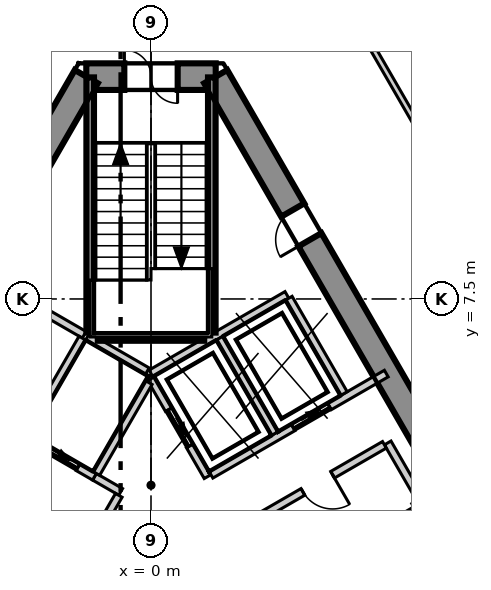
"""IFC4 building model, lengths in metres.
Left out: names, types, materials, properties, quantities, classifications, styles, units other than length and angle.
Written with IfcOpenShell. Run it as: python <this file> out.ifc"""

import sys

from ifc_helpers import new_model, si_unit, direction, frame, frame_2d, origin, place, context, subcontext, project, spatial, polyline, rectangle, outline, extrude, element, fill, save


model = new_model("IFC4")
c1 = context("Model", 3, precision=1e-05, world=origin(), true_north=direction((0.0, 1.0)))
c2 = subcontext(c1, "Body", "Model", "MODEL_VIEW")
j1 = project(units=[si_unit("LENGTHUNIT", "METRE"), si_unit("PLANEANGLEUNIT", "RADIAN")], contexts=[c1])
p1 = place(None, origin())
s1 = spatial("IfcSite", under=j1, at=p1, CompositionType="ELEMENT")
p2 = place(p1, origin())
s2 = spatial("IfcBuilding", under=s1, at=p2, CompositionType="ELEMENT")
p3 = place(p2, frame((0.0, 0.0, 191.3)))
s3 = spatial("IfcBuildingStorey", under=s2, at=p3, CompositionType="ELEMENT", Elevation=191.3)
p4 = place(p3, frame((1.703, 13.35, -0.3), z_axis=(0.0, 0.0, 1.0), x_axis=(-1.0, 0.0, 0.0)))
e1 = element("IfcWall", 1, at=p4, inside=s3, PredefinedType="SHEAR", context=c2, shape_type="SweptSolid", body=[
    extrude(outline(polyline([(-0.202, -0.35), (1.703, -0.35), (3.608, -0.35), (3.204, 0.35), (1.703, 0.35), (0.202, 0.35), (-0.202, -0.35)])), origin(), (0.0, 0.0, 1.0), 4.0),
])
p5 = place(p4, frame((1.003, 0.0, 0.3)))
e2 = element("IfcOpeningElement", 2, at=p5, cuts=e1, PredefinedType="OPENING", context=c2, shape_type="SweptSolid", body=[
    extrude(rectangle(XDim=1.4, YDim=2.1, at=frame_2d((0.7, 1.05))), frame((0.0, 0.36, 0.0), z_axis=(0.0, -1.0, 0.0), x_axis=(1.0, 0.0, 0.0)), (0.0, 0.0, 1.0), 0.72),
])
p6 = place(p3, frame((-1.703, 13.35, -0.3), z_axis=(0.0, 0.0, 1.0), x_axis=(-0.500011533395, -0.866018744874, 0.0)))
e3 = element("IfcWall", 3, at=p6, inside=s3, PredefinedType="SHEAR", context=c2, shape_type="SweptSolid", body=[
    extrude(outline(polyline([(-0.202, -0.35), (1.782, -0.35), (3.766, -0.35), (5.75, -0.35), (7.734, -0.35), (9.718, -0.35), (11.702, -0.35), (13.686, -0.35), (15.67, -0.35), (17.654, -0.35), (19.638, -0.35), (21.622, -0.35), (21.218, 0.35), (19.307, 0.35), (17.397, 0.35), (15.486, 0.35), (13.576, 0.35), (11.665, 0.35), (9.755, 0.35), (7.844, 0.35), (5.934, 0.35), (4.023, 0.35), (2.113, 0.35), (0.202, 0.35), (-0.202, -0.35)])), origin(), (0.0, 0.0, 1.0), 4.0),
])
p7 = place(p6, frame((10.16, 0.0, 0.3)))
e4 = element("IfcOpeningElement", 4, at=p7, cuts=e3, PredefinedType="OPENING", context=c2, shape_type="SweptSolid", body=[
    extrude(rectangle(XDim=1.1, YDim=2.1, at=frame_2d((0.55, 1.05))), frame((0.0, 0.36, 0.0), z_axis=(0.0, -1.0, 0.0), x_axis=(1.0, 0.0, 0.0)), (0.0, 0.0, 1.0), 0.72),
])
p8 = place(p3, frame((12.413, -5.2, -0.3), z_axis=(0.0, 0.0, 1.0), x_axis=(-0.500011533395, 0.866018744874, 0.0)))
e5 = element("IfcWall", 5, at=p8, inside=s3, PredefinedType="SHEAR", context=c2, shape_type="SweptSolid", body=[
    extrude(outline(polyline([(-0.202, -0.35), (1.782, -0.35), (3.766, -0.35), (5.75, -0.35), (7.734, -0.35), (9.718, -0.35), (11.702, -0.35), (13.686, -0.35), (15.67, -0.35), (17.654, -0.35), (19.638, -0.35), (21.622, -0.35), (21.218, 0.35), (19.307, 0.35), (17.397, 0.35), (15.486, 0.35), (13.576, 0.35), (11.665, 0.35), (9.755, 0.35), (7.844, 0.35), (5.934, 0.35), (4.023, 0.35), (2.113, 0.35), (0.202, 0.35), (-0.202, -0.35)])), origin(), (0.0, 0.0, 1.0), 4.0),
])
p9 = place(p8, frame((4.055, 0.0, 0.3)))
e6 = element("IfcOpeningElement", 6, at=p9, cuts=e5, PredefinedType="OPENING", context=c2, shape_type="SweptSolid", body=[
    extrude(rectangle(XDim=0.9, YDim=2.1, at=frame_2d((0.45, 1.05))), frame((0.0, 0.36, 0.0), z_axis=(0.0, -1.0, 0.0), x_axis=(1.0, 0.0, 0.0)), (0.0, 0.0, 1.0), 0.72),
])
p10 = place(p8, frame((16.465, 0.0, 0.3)))
e7 = element("IfcOpeningElement", 7, at=p10, cuts=e5, PredefinedType="OPENING", context=c2, shape_type="SweptSolid", body=[
    extrude(rectangle(XDim=0.9, YDim=2.1, at=frame_2d((0.45, 1.05))), frame((0.0, 0.36, 0.0), z_axis=(0.0, -1.0, 0.0), x_axis=(1.0, 0.0, 0.0)), (0.0, 0.0, 1.0), 0.72),
])
p11 = place(p3, frame((29.165, -13.525, 0.0), z_axis=(0.0, 0.0, 1.0), x_axis=(-0.500008941164, 0.86602024154, 0.0)))
e8 = element("IfcWall", 8, at=p11, inside=s3, PredefinedType="ELEMENTEDWALL", context=c2, shape_type="SweptSolid", body=[
    extrude(rectangle(XDim=52.571, YDim=0.2, at=frame_2d((26.286, 0.0))), origin(), (0.0, 0.0, 1.0), 3.7),
])
p12 = place(p11, frame((2.327, 0.0, 0.9)))
e9 = element("IfcOpeningElement", 9, at=p12, cuts=e8, PredefinedType="OPENING", context=c2, shape_type="SweptSolid", body=[
    extrude(rectangle(XDim=4.2, YDim=2.5, at=frame_2d((2.1, 1.25))), frame((0.0, 0.11, 0.0), z_axis=(0.0, -1.0, 0.0), x_axis=(1.0, 0.0, 0.0)), (0.0, 0.0, 1.0), 0.22),
])
p13 = place(p11, frame((8.575, 0.0, 0.9)))
e10 = element("IfcOpeningElement", 10, at=p13, cuts=e8, PredefinedType="OPENING", context=c2, shape_type="SweptSolid", body=[
    extrude(rectangle(XDim=4.2, YDim=2.5, at=frame_2d((2.1, 1.25))), frame((0.0, 0.11, 0.0), z_axis=(0.0, -1.0, 0.0), x_axis=(1.0, 0.0, 0.0)), (0.0, 0.0, 1.0), 0.22),
])
p14 = place(p11, frame((14.823, 0.0, 0.9)))
e11 = element("IfcOpeningElement", 11, at=p14, cuts=e8, PredefinedType="OPENING", context=c2, shape_type="SweptSolid", body=[
    extrude(rectangle(XDim=4.2, YDim=2.5, at=frame_2d((2.1, 1.25))), frame((0.0, 0.11, 0.0), z_axis=(0.0, -1.0, 0.0), x_axis=(1.0, 0.0, 0.0)), (0.0, 0.0, 1.0), 0.22),
])
p15 = place(p11, frame((21.072, 0.0, 0.9)))
e12 = element("IfcOpeningElement", 12, at=p15, cuts=e8, PredefinedType="OPENING", context=c2, shape_type="SweptSolid", body=[
    extrude(rectangle(XDim=4.2, YDim=2.5, at=frame_2d((2.1, 1.25))), frame((0.0, 0.11, 0.0), z_axis=(0.0, -1.0, 0.0), x_axis=(1.0, 0.0, 0.0)), (0.0, 0.0, 1.0), 0.22),
])
p16 = place(p11, frame((27.32, 0.0, 0.9)))
e13 = element("IfcOpeningElement", 13, at=p16, cuts=e8, PredefinedType="OPENING", context=c2, shape_type="SweptSolid", body=[
    extrude(rectangle(XDim=4.2, YDim=2.5, at=frame_2d((2.1, 1.25))), frame((0.0, 0.11, 0.0), z_axis=(0.0, -1.0, 0.0), x_axis=(1.0, 0.0, 0.0)), (0.0, 0.0, 1.0), 0.22),
])
p17 = place(p11, frame((33.568, 0.0, 0.9)))
e14 = element("IfcOpeningElement", 14, at=p17, cuts=e8, PredefinedType="OPENING", context=c2, shape_type="SweptSolid", body=[
    extrude(rectangle(XDim=4.2, YDim=2.5, at=frame_2d((2.1, 1.25))), frame((0.0, 0.11, 0.0), z_axis=(0.0, -1.0, 0.0), x_axis=(1.0, 0.0, 0.0)), (0.0, 0.0, 1.0), 0.22),
])
p18 = place(p11, frame((39.816, 0.0, 0.9)))
e15 = element("IfcOpeningElement", 15, at=p18, cuts=e8, PredefinedType="OPENING", context=c2, shape_type="SweptSolid", body=[
    extrude(rectangle(XDim=4.2, YDim=2.5, at=frame_2d((2.1, 1.25))), frame((0.0, 0.11, 0.0), z_axis=(0.0, -1.0, 0.0), x_axis=(1.0, 0.0, 0.0)), (0.0, 0.0, 1.0), 0.22),
])
p19 = place(p11, frame((46.064, 0.0, 0.9)))
e16 = element("IfcOpeningElement", 16, at=p19, cuts=e8, PredefinedType="OPENING", context=c2, shape_type="SweptSolid", body=[
    extrude(rectangle(XDim=4.2, YDim=2.5, at=frame_2d((2.1, 1.25))), frame((0.0, 0.11, 0.0), z_axis=(0.0, -1.0, 0.0), x_axis=(1.0, 0.0, 0.0)), (0.0, 0.0, 1.0), 0.22),
])
p20 = place(p3, frame((-20.882, -11.969, 0.0), z_axis=(0.0, 0.0, 1.0), x_axis=(0.499998738735, 0.866026131975, 0.0)))
e17 = element("IfcWall", 17, at=p20, inside=s3, PredefinedType="PARTITIONING", context=c2, shape_type="SweptSolid", body=[
    extrude(rectangle(XDim=41.764, YDim=0.15, at=frame_2d((20.882, 0.0))), origin(), (0.0, 0.0, 1.0), 3.7),
])
p21 = place(p20, frame((37.014, 0.0, 0.0)))
e18 = element("IfcOpeningElement", 18, at=p21, cuts=e17, PredefinedType="OPENING", context=c2, shape_type="SweptSolid", body=[
    extrude(rectangle(XDim=1.0, YDim=2.1, at=frame_2d((0.5, 1.05))), frame((0.0, 0.085, 0.0), z_axis=(0.0, -1.0, 0.0), x_axis=(1.0, 0.0, 0.0)), (0.0, 0.0, 1.0), 0.17),
])
p22 = place(p20, frame((29.653, 0.0, 0.0)))
e19 = element("IfcOpeningElement", 19, at=p22, cuts=e17, PredefinedType="OPENING", context=c2, shape_type="SweptSolid", body=[
    extrude(rectangle(XDim=1.0, YDim=2.1, at=frame_2d((0.5, 1.05))), frame((0.0, 0.085, 0.0), z_axis=(0.0, -1.0, 0.0), x_axis=(1.0, 0.0, 0.0)), (0.0, 0.0, 1.0), 0.17),
])
p23 = place(p20, frame((23.405, 0.0, 0.0)))
e20 = element("IfcOpeningElement", 20, at=p23, cuts=e17, PredefinedType="OPENING", context=c2, shape_type="SweptSolid", body=[
    extrude(rectangle(XDim=1.0, YDim=2.1, at=frame_2d((0.5, 1.05))), frame((0.0, 0.085, 0.0), z_axis=(0.0, -1.0, 0.0), x_axis=(1.0, 0.0, 0.0)), (0.0, 0.0, 1.0), 0.17),
])
p24 = place(p20, frame((9.657, 0.0, 0.0)))
e21 = element("IfcOpeningElement", 21, at=p24, cuts=e17, PredefinedType="OPENING", context=c2, shape_type="SweptSolid", body=[
    extrude(rectangle(XDim=1.1, YDim=2.1, at=frame_2d((0.55, 1.05))), frame((0.0, 0.085, 0.0), z_axis=(0.0, -1.0, 0.0), x_axis=(1.0, 0.0, 0.0)), (0.0, 0.0, 1.0), 0.17),
])
p25 = place(p20, frame((18.757, 0.0, 0.0)))
e22 = element("IfcOpeningElement", 22, at=p25, cuts=e17, PredefinedType="OPENING", context=c2, shape_type="SweptSolid", body=[
    extrude(rectangle(XDim=0.9, YDim=2.1, at=frame_2d((0.45, 1.05))), frame((0.0, 0.085, 0.0), z_axis=(0.0, -1.0, 0.0), x_axis=(1.0, 0.0, 0.0)), (0.0, 0.0, 1.0), 0.17),
])
p26 = place(p20, frame((15.557, 0.0, 0.0)))
e23 = element("IfcOpeningElement", 23, at=p26, cuts=e17, PredefinedType="OPENING", context=c2, shape_type="SweptSolid", body=[
    extrude(rectangle(XDim=0.9, YDim=2.1, at=frame_2d((0.45, 1.05))), frame((0.0, 0.085, 0.0), z_axis=(0.0, -1.0, 0.0), x_axis=(1.0, 0.0, 0.0)), (0.0, 0.0, 1.0), 0.17),
])
p27 = place(p20, frame((12.657, 0.0, 0.0)))
e24 = element("IfcOpeningElement", 24, at=p27, cuts=e17, PredefinedType="OPENING", context=c2, shape_type="SweptSolid", body=[
    extrude(rectangle(XDim=1.0, YDim=2.1, at=frame_2d((0.5, 1.05))), frame((0.0, 0.085, 0.0), z_axis=(0.0, -1.0, 0.0), x_axis=(1.0, 0.0, 0.0)), (0.0, 0.0, 1.0), 0.17),
])
p28 = place(p20, frame((3.56, 0.0, 0.0)))
e25 = element("IfcOpeningElement", 25, at=p28, cuts=e17, PredefinedType="OPENING", context=c2, shape_type="SweptSolid", body=[
    extrude(rectangle(XDim=1.1, YDim=2.1, at=frame_2d((0.55, 1.05))), frame((0.0, 0.085, 0.0), z_axis=(0.0, -1.0, 0.0), x_axis=(1.0, 0.0, 0.0)), (0.0, 0.0, 1.0), 0.17),
])
p29 = place(p3, frame((0.075, 24.07, 0.0), z_axis=(0.0, 0.0, 1.0), x_axis=(0.49999939571, -0.866025752671, 0.0)))
e26 = element("IfcWall", 26, at=p29, inside=s3, PredefinedType="PARTITIONING", context=c2, shape_type="SweptSolid", body=[
    extrude(rectangle(XDim=41.614, YDim=0.15, at=frame_2d((20.807, 0.0))), origin(), (0.0, 0.0, 1.0), 3.7),
])
p30 = place(p29, frame((37.015, 0.0, 0.0)))
e27 = element("IfcOpeningElement", 27, at=p30, cuts=e26, PredefinedType="OPENING", context=c2, shape_type="SweptSolid", body=[
    extrude(rectangle(XDim=1.1, YDim=2.1, at=frame_2d((0.55, 1.05))), frame((0.0, 0.085, 0.0), z_axis=(0.0, -1.0, 0.0), x_axis=(1.0, 0.0, 0.0)), (0.0, 0.0, 1.0), 0.17),
])
p31 = place(p29, frame((25.154, 0.0, 0.0)))
e28 = element("IfcOpeningElement", 28, at=p31, cuts=e26, PredefinedType="OPENING", context=c2, shape_type="SweptSolid", body=[
    extrude(rectangle(XDim=1.0, YDim=2.1, at=frame_2d((0.5, 1.05))), frame((0.0, 0.085, 0.0), z_axis=(0.0, -1.0, 0.0), x_axis=(1.0, 0.0, 0.0)), (0.0, 0.0, 1.0), 0.17),
])
p32 = place(p29, frame((31.454, 0.0, 0.0)))
e29 = element("IfcOpeningElement", 29, at=p32, cuts=e26, PredefinedType="OPENING", context=c2, shape_type="SweptSolid", body=[
    extrude(rectangle(XDim=0.9, YDim=2.1, at=frame_2d((0.45, 1.05))), frame((0.0, 0.085, 0.0), z_axis=(0.0, -1.0, 0.0), x_axis=(1.0, 0.0, 0.0)), (0.0, 0.0, 1.0), 0.17),
])
p33 = place(p29, frame((17.157, 0.0, 0.0)))
e30 = element("IfcOpeningElement", 30, at=p33, cuts=e26, PredefinedType="OPENING", context=c2, shape_type="SweptSolid", body=[
    extrude(rectangle(XDim=1.0, YDim=2.1, at=frame_2d((0.5, 1.05))), frame((0.0, 0.085, 0.0), z_axis=(0.0, -1.0, 0.0), x_axis=(1.0, 0.0, 0.0)), (0.0, 0.0, 1.0), 0.17),
])
p34 = place(p29, frame((6.609, 0.0, 0.0)))
e31 = element("IfcOpeningElement", 31, at=p34, cuts=e26, PredefinedType="OPENING", context=c2, shape_type="SweptSolid", body=[
    extrude(rectangle(XDim=1.1, YDim=2.1, at=frame_2d((0.55, 1.05))), frame((0.0, 0.085, 0.0), z_axis=(0.0, -1.0, 0.0), x_axis=(1.0, 0.0, 0.0)), (0.0, 0.0, 1.0), 0.17),
])
p35 = place(p3, frame((6.051, 17.32, 0.0), z_axis=(0.0, 0.0, 1.0), x_axis=(0.499991765245, -0.86603015807, 0.0)))
e32 = element("IfcWall", 32, at=p35, inside=s3, PredefinedType="PARTITIONING", context=c2, shape_type="SweptSolid", body=[
    extrude(rectangle(XDim=5.65, YDim=0.15, at=frame_2d((2.825, 0.0))), origin(), (0.0, 0.0, 1.0), 3.7),
])
p36 = place(p35, frame((3.475, 0.0, 0.0)))
e33 = element("IfcOpeningElement", 33, at=p36, cuts=e32, PredefinedType="OPENING", context=c2, shape_type="SweptSolid", body=[
    extrude(rectangle(XDim=0.9, YDim=2.1, at=frame_2d((0.45, 1.05))), frame((0.0, 0.085, 0.0), z_axis=(0.0, -1.0, 0.0), x_axis=(1.0, 0.0, 0.0)), (0.0, 0.0, 1.0), 0.17),
])
p37 = place(p3, frame((-0.002, 5.541, 0.0), z_axis=(0.0, 0.0, 1.0), x_axis=(0.86600155993, 0.500041296494, 0.0)))
e34 = element("IfcWall", 34, at=p37, inside=s3, PredefinedType="SOLIDWALL", context=c2, shape_type="SweptSolid", body=[
    extrude(rectangle(XDim=4.132, YDim=0.2, at=frame_2d((2.066, 0.0))), origin(), (0.0, 0.0, 1.0), 3.7),
])
p38 = place(p3, frame((0.0, 5.4, 0.0), z_axis=(0.0, 0.0, 1.0), x_axis=(0.500103862429, -0.865965430478, 0.0)))
e35 = element("IfcWall", 35, at=p38, inside=s3, PredefinedType="SOLIDWALL", context=c2, shape_type="SweptSolid", body=[
    extrude(rectangle(XDim=2.973, YDim=0.2, at=frame_2d((1.487, 0.0))), origin(), (0.0, 0.0, 1.0), 3.7),
])
p39 = place(p38, frame((0.937, 0.0, 0.0)))
e36 = element("IfcOpeningElement", 36, at=p39, cuts=e35, PredefinedType="OPENING", context=c2, shape_type="SweptSolid", body=[
    extrude(rectangle(XDim=1.1, YDim=2.1, at=frame_2d((0.55, 1.05))), frame((0.0, 0.11, 0.0), z_axis=(0.0, -1.0, 0.0), x_axis=(1.0, 0.0, 0.0)), (0.0, 0.0, 1.0), 0.22),
])
p40 = place(p3, frame((1.578, 2.874, 0.0), z_axis=(0.0, 0.0, 1.0), x_axis=(0.866045911672, 0.499964477614, 0.0)))
e37 = element("IfcWall", 37, at=p40, inside=s3, PredefinedType="SOLIDWALL", context=c2, shape_type="SweptSolid", body=[
    extrude(rectangle(XDim=5.327, YDim=0.2, at=frame_2d((2.663, 0.0))), origin(), (0.0, 0.0, 1.0), 3.7),
])
p41 = place(p40, frame((2.496, 0.0, 0.0)))
e38 = element("IfcOpeningElement", 38, at=p41, cuts=e37, PredefinedType="OPENING", context=c2, shape_type="SweptSolid", body=[
    extrude(rectangle(XDim=1.1, YDim=2.1, at=frame_2d((0.55, 1.05))), frame((0.0, 0.11, 0.0), z_axis=(0.0, -1.0, 0.0), x_axis=(1.0, 0.0, 0.0)), (0.0, 0.0, 1.0), 0.22),
])
for number, where, z_axis, x_axis in (
    (39, (3.626, 7.52, 0.0), (0.0, 0.0, 1.0), (0.5, -0.866, 0.0)),
    (40, (1.807, 6.47, 0.0), (0.0, 0.0, 1.0), (0.5, -0.866, 0.0)),
):
    element("IfcWall", number, at=place(p3, frame(where, z_axis=z_axis, x_axis=x_axis)), inside=s3, PredefinedType="SOLIDWALL", context=c2, shape_type="SweptSolid", body=[
        extrude(rectangle(XDim=2.9, YDim=0.2, at=frame_2d((1.45, 0.0))), origin(), (0.0, 0.0, 1.0), 3.7),
    ])
p42 = place(p3, frame((6.229, 3.712, 0.0), z_axis=(0.0, 0.0, 1.0), x_axis=(0.499875724984, -0.86609714211, 0.0)))
e41 = element("IfcWall", 41, at=p42, inside=s3, PredefinedType="SOLIDWALL", context=c2, shape_type="SweptSolid", body=[
    extrude(rectangle(XDim=1.701, YDim=0.2, at=frame_2d((0.85, 0.0))), origin(), (0.0, 0.0, 1.0), 3.7),
])
p43 = place(p3, frame((2.548, 1.587, 0.0), z_axis=(0.0, 0.0, 1.0), x_axis=(0.866004344652, 0.500036473714, 0.0)))
e42 = element("IfcWall", 42, at=p43, inside=s3, PredefinedType="SOLIDWALL", context=c2, shape_type="SweptSolid", body=[
    extrude(rectangle(XDim=4.15, YDim=0.2, at=frame_2d((2.075, 0.0))), origin(), (0.0, 0.0, 1.0), 3.7),
])
p44 = place(p43, frame((1.675, 0.0, 0.0)))
e43 = element("IfcOpeningElement", 43, at=p44, cuts=e42, PredefinedType="OPENING", context=c2, shape_type="SweptSolid", body=[
    extrude(rectangle(XDim=0.9, YDim=2.1, at=frame_2d((0.45, 1.05))), frame((0.0, 0.11, 0.0), z_axis=(0.0, -1.0, 0.0), x_axis=(1.0, 0.0, 0.0)), (0.0, 0.0, 1.0), 0.22),
])
p45 = place(p3, frame((-1.488, 2.822, 0.0), z_axis=(0.0, 0.0, 1.0), x_axis=(0.866236612152, -0.499633997809, 0.0)))
e44 = element("IfcWall", 44, at=p45, inside=s3, PredefinedType="SOLIDWALL", context=c2, shape_type="SweptSolid", body=[
    extrude(rectangle(XDim=0.796, YDim=0.2, at=frame_2d((0.398, 0.0))), origin(), (0.0, 0.0, 1.0), 3.7),
])
p46 = place(p3, frame((-3.489, 7.557, 0.0), z_axis=(0.0, 0.0, 1.0), x_axis=(0.866010750942, -0.50002537861, 0.0)))
e45 = element("IfcWall", 45, at=p46, inside=s3, PredefinedType="SOLIDWALL", context=c2, shape_type="SweptSolid", body=[
    extrude(rectangle(XDim=2.0, YDim=0.2, at=frame_2d((1.0, 0.0))), origin(), (0.0, 0.0, 1.0), 3.7),
])
p47 = place(p3, frame((-2.444, -0.433, 0.0), z_axis=(0.0, 0.0, 1.0), x_axis=(0.500035624827, 0.866004834804, 0.0)))
e46 = element("IfcWall", 46, at=p47, inside=s3, PredefinedType="SOLIDWALL", context=c2, shape_type="SweptSolid", body=[
    extrude(rectangle(XDim=3.194, YDim=0.2, at=frame_2d((1.597, 0.0))), origin(), (0.0, 0.0, 1.0), 3.7),
])
p48 = place(p3, frame((-3.309, 3.873, 0.0), z_axis=(0.0, 0.0, 1.0), x_axis=(0.866098583652, -0.499873227325, 0.0)))
e47 = element("IfcWall", 47, at=p48, inside=s3, PredefinedType="SOLIDWALL", context=c2, shape_type="SweptSolid", body=[
    extrude(rectangle(XDim=2.103, YDim=0.2, at=frame_2d((1.051, 0.0))), origin(), (0.0, 0.0, 1.0), 3.7),
])
p49 = place(p48, frame((0.502, 0.0, 0.0)))
e48 = element("IfcOpeningElement", 48, at=p49, cuts=e47, PredefinedType="OPENING", context=c2, shape_type="SweptSolid", body=[
    extrude(rectangle(XDim=1.1, YDim=2.1, at=frame_2d((0.55, 1.05))), frame((0.0, 0.11, 0.0), z_axis=(0.0, -1.0, 0.0), x_axis=(1.0, 0.0, 0.0)), (0.0, 0.0, 1.0), 0.22),
])
p50 = place(p3, frame((-3.257, 3.959, 0.0), z_axis=(0.0, 0.0, 1.0), x_axis=(0.50012328804, 0.865954211699, 0.0)))
e49 = element("IfcWall", 49, at=p50, inside=s3, PredefinedType="SOLIDWALL", context=c2, shape_type="SweptSolid", body=[
    extrude(rectangle(XDim=2.9, YDim=0.2, at=frame_2d((1.45, 0.0))), origin(), (0.0, 0.0, 1.0), 3.7),
])
p51 = place(p3, frame((-1.67, 6.507, 0.0), z_axis=(0.0, 0.0, 1.0), x_axis=(0.865941441609, -0.500145398563, 0.0)))
e50 = element("IfcWall", 50, at=p51, inside=s3, PredefinedType="SOLIDWALL", context=c2, shape_type="SweptSolid", body=[
    extrude(rectangle(XDim=1.815, YDim=0.2, at=frame_2d((0.908, 0.0))), origin(), (0.0, 0.0, 1.0), 3.7),
])
p52 = place(p3, frame((-1.438, 2.909, 0.0), z_axis=(0.0, 0.0, 1.0), x_axis=(0.499829630636, 0.866123744241, 0.0)))
e51 = element("IfcWall", 51, at=p52, inside=s3, PredefinedType="SOLIDWALL", context=c2, shape_type="SweptSolid", body=[
    extrude(rectangle(XDim=2.761, YDim=0.2, at=frame_2d((1.38, 0.0))), origin(), (0.0, 0.0, 1.0), 3.7),
])
p53 = place(p3, frame((6.826, 1.978, 0.0), z_axis=(0.0, 0.0, 1.0), x_axis=(0.499990139034, -0.866031096941, 0.0)))
e52 = element("IfcWall", 52, at=p53, inside=s3, PredefinedType="SOLIDWALL", context=c2, shape_type="SweptSolid", body=[
    extrude(rectangle(XDim=3.0, YDim=0.2, at=frame_2d((1.5, 0.0))), origin(), (0.0, 0.0, 1.0), 3.7),
])
p54 = place(p3, frame((1.6, 6.615, 0.0), z_axis=(0.0, 0.0, 1.0), x_axis=(0.0, 1.0, 0.0)))
e53 = element("IfcWall", 53, at=p54, inside=s3, PredefinedType="SOLIDWALL", context=c2, shape_type="SweptSolid", body=[
    extrude(rectangle(XDim=6.715, YDim=0.2, at=frame_2d((3.357, 0.0))), origin(), (0.0, 0.0, 1.0), 3.7),
])
p55 = place(p3, frame((-1.4, 6.5, 0.0), z_axis=(0.0, 0.0, 1.0), x_axis=(1.0, 0.0, 0.0)))
e54 = element("IfcWall", 54, at=p55, inside=s3, PredefinedType="SOLIDWALL", context=c2, shape_type="SweptSolid", body=[
    extrude(rectangle(XDim=2.8, YDim=0.2, at=frame_2d((1.4, 0.0))), origin(), (0.0, 0.0, 1.0), 3.7),
])
p56 = place(p3, frame((-1.6, 6.615, 0.0), z_axis=(0.0, 0.0, 1.0), x_axis=(0.0, 1.0, 0.0)))
e55 = element("IfcWall", 55, at=p56, inside=s3, PredefinedType="SOLIDWALL", context=c2, shape_type="SweptSolid", body=[
    extrude(rectangle(XDim=6.715, YDim=0.2, at=frame_2d((3.357, 0.0))), origin(), (0.0, 0.0, 1.0), 3.7),
])
p57 = place(p39, origin())
e56 = element("IfcDoor", 56, at=p57, inside=s3, OperationType="SLIDING_TO_LEFT", PredefinedType="DOOR", context=c2, shape_type="SweptSolid", body=[
    extrude(rectangle(XDim=1.1, YDim=2.1, at=frame_2d((0.55, 1.05))), frame((0.0, 0.025, 0.0), z_axis=(0.0, -1.0, 0.0), x_axis=(1.0, 0.0, 0.0)), (0.0, 0.0, 1.0), 0.05),
])
fill(e36, e56)
p58 = place(p41, origin())
e57 = element("IfcDoor", 57, at=p58, inside=s3, OperationType="SLIDING_TO_LEFT", PredefinedType="DOOR", context=c2, shape_type="SweptSolid", body=[
    extrude(rectangle(XDim=1.1, YDim=2.1, at=frame_2d((0.55, 1.05))), frame((0.0, 0.025, 0.0), z_axis=(0.0, -1.0, 0.0), x_axis=(1.0, 0.0, 0.0)), (0.0, 0.0, 1.0), 0.05),
])
fill(e38, e57)
p59 = place(p49, origin())
e58 = element("IfcDoor", 58, at=p59, inside=s3, OperationType="SLIDING_TO_LEFT", PredefinedType="DOOR", context=c2, shape_type="SweptSolid", body=[
    extrude(rectangle(XDim=1.1, YDim=2.1, at=frame_2d((0.55, 1.05))), frame((0.0, 0.025, 0.0), z_axis=(0.0, -1.0, 0.0), x_axis=(1.0, 0.0, 0.0)), (0.0, 0.0, 1.0), 0.05),
])
fill(e48, e58)
p60 = place(p5, origin())
e59 = element("IfcDoor", 59, at=p60, inside=s3, OperationType="DOUBLE_DOOR_SINGLE_SWING", PredefinedType="DOOR", context=c2, shape_type="SweptSolid", body=[
    extrude(rectangle(XDim=1.4, YDim=2.1, at=frame_2d((0.7, 1.05))), frame((0.0, 0.025, 0.0), z_axis=(0.0, -1.0, 0.0), x_axis=(1.0, 0.0, 0.0)), (0.0, 0.0, 1.0), 0.05),
])
fill(e2, e59)
p61 = place(p10, origin())
e60 = element("IfcDoor", 60, at=p61, inside=s3, OperationType="SINGLE_SWING_RIGHT", PredefinedType="DOOR", context=c2, shape_type="SweptSolid", body=[
    extrude(rectangle(XDim=0.9, YDim=2.1, at=frame_2d((0.45, 1.05))), frame((0.0, 0.025, 0.0), z_axis=(0.0, -1.0, 0.0), x_axis=(1.0, 0.0, 0.0)), (0.0, 0.0, 1.0), 0.05),
])
fill(e7, e60)
p62 = place(p44, origin())
e61 = element("IfcDoor", 61, at=p62, inside=s3, OperationType="SINGLE_SWING_RIGHT", PredefinedType="DOOR", context=c2, shape_type="SweptSolid", body=[
    extrude(rectangle(XDim=0.9, YDim=2.1, at=frame_2d((0.45, 1.05))), frame((0.0, 0.025, 0.0), z_axis=(0.0, -1.0, 0.0), x_axis=(1.0, 0.0, 0.0)), (0.0, 0.0, 1.0), 0.05),
])
fill(e43, e61)
save(model, sys.argv[1])
